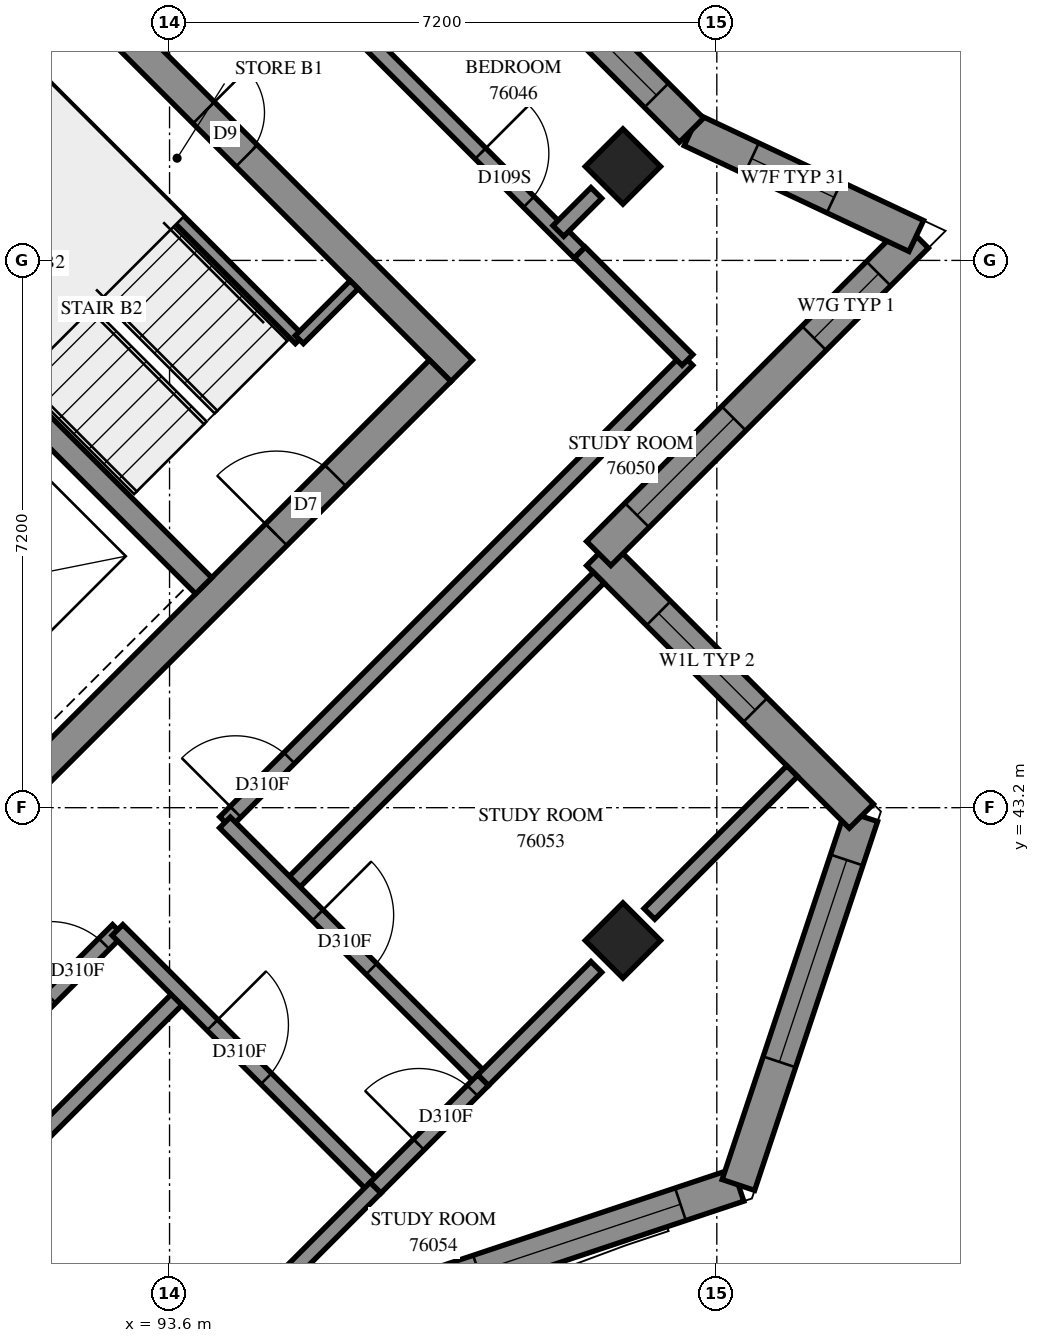
"""IFC4 building model, lengths in metres.
Left out: names, types, materials, properties, quantities, classifications, styles, units other than length and angle.
Written with IfcOpenShell. Run it as: python <this file> out.ifc"""

import sys

from ifc_helpers import new_model, si_unit, direction, frame, frame_2d, origin, origin_2d, place, context, subcontext, project, spatial, polyline, rectangle, outline, extrude, element, fill, save


model = new_model("IFC4")
c1 = context("Model", 3, precision=1e-05, world=origin(), true_north=direction((0.0, 1.0)))
c2 = subcontext(c1, "Body", "Model", "MODEL_VIEW")
j1 = project(units=[si_unit("LENGTHUNIT", "METRE"), si_unit("PLANEANGLEUNIT", "RADIAN")], contexts=[c1])
p1 = place(None, origin())
s1 = spatial("IfcSite", under=j1, at=p1, CompositionType="ELEMENT")
p2 = place(p1, origin())
s2 = spatial("IfcBuilding", under=s1, at=p2, CompositionType="ELEMENT")
p3 = place(p2, frame((0.0, 0.0, 277.8)))
s3 = spatial("IfcBuildingStorey", under=s2, at=p3, CompositionType="ELEMENT", Elevation=277.8)
for number, where, z_axis, x_axis in (
    (1, (99.565, 51.635, 0.0), (0.0, 0.0, 1.0), (0.707, -0.707, 0.0)),
    (2, (99.565, 41.453, 0.0), (0.0, 0.0, 1.0), (0.707, -0.707, 0.0)),
):
    element("IfcColumn", number, at=place(p3, frame(where, z_axis=z_axis, x_axis=x_axis)), inside=s3, PredefinedType="COLUMN", context=c2, shape_type="SweptSolid", body=[
        extrude(rectangle(XDim=0.7, YDim=0.7, at=origin_2d()), origin(), (0.0, 0.0, 1.0), 3.1),
    ])
p4 = place(p3, frame((86.695, 59.696, -0.3), z_axis=(0.0, 0.0, 1.0), x_axis=(0.7071100706, -0.7071034917, 0.0)))
e3 = element("IfcWall", 3, at=p4, inside=s3, PredefinedType="SHEAR", context=c2, shape_type="SweptSolid", body=[
    extrude(rectangle(XDim=15.2, YDim=0.4, at=frame_2d((7.6, 0.0))), origin(), (0.0, 0.0, 1.0), 2.7),
])
p5 = place(p4, frame((10.4, 0.0, 0.3)))
e4 = element("IfcOpeningElement", 4, at=p5, cuts=e3, PredefinedType="OPENING", context=c2, shape_type="SweptSolid", body=[
    extrude(rectangle(XDim=0.8, YDim=2.1, at=frame_2d((0.4, 1.05))), frame((0.0, 0.21, 0.0), z_axis=(0.0, -1.0, 0.0), x_axis=(1.0, 0.0, 0.0)), (0.0, 0.0, 1.0), 0.42),
])
p6 = place(p3, frame((86.978, 38.766, -0.3), z_axis=(0.0, 0.0, 1.0), x_axis=(0.7071067812, 0.7071067812, 0.0)))
e5 = element("IfcWall", 5, at=p6, inside=s3, PredefinedType="SHEAR", context=c2, shape_type="SweptSolid", body=[
    extrude(rectangle(XDim=14.4, YDim=0.4, at=frame_2d((7.2, 0.0))), origin(), (0.0, 0.0, 1.0), 2.7),
])
p7 = place(p6, frame((4.55, 0.0, 0.3)))
e6 = element("IfcOpeningElement", 6, at=p7, cuts=e5, PredefinedType="OPENING", context=c2, shape_type="SweptSolid", body=[
    extrude(rectangle(XDim=1.1, YDim=2.1, at=frame_2d((0.55, 1.05))), frame((0.0, 0.21, 0.0), z_axis=(0.0, -1.0, 0.0), x_axis=(1.0, 0.0, 0.0)), (0.0, 0.0, 1.0), 0.42),
])
p8 = place(p6, frame((11.35, 0.0, 0.3)))
e7 = element("IfcOpeningElement", 7, at=p8, cuts=e5, PredefinedType="OPENING", context=c2, shape_type="SweptSolid", body=[
    extrude(rectangle(XDim=1.1, YDim=2.1, at=frame_2d((0.55, 1.05))), frame((0.0, 0.21, 0.0), z_axis=(0.0, -1.0, 0.0), x_axis=(1.0, 0.0, 0.0)), (0.0, 0.0, 1.0), 0.42),
])
p9 = place(p3, frame((88.958, 51.211, 0.0), z_axis=(0.0, 0.0, 1.0), x_axis=(0.7070998367, -0.7071137256, 0.0)))
e8 = element("IfcWall", 8, at=p9, inside=s3, PredefinedType="SOLIDWALL", context=c2, shape_type="SweptSolid", body=[
    extrude(rectangle(XDim=7.2, YDim=0.3, at=frame_2d((3.6, 0.0))), origin(), (0.0, 0.0, 1.0), 3.1),
])
p10 = place(p3, frame((96.049, 36.559, 0.0), z_axis=(0.0, 0.0, 1.0), x_axis=(0.9486870665, 0.3162164604, 0.0)))
e9 = element("IfcWall", 9, at=p10, inside=s3, PredefinedType="SOLIDWALL", context=c2, shape_type="SweptSolid", body=[
    extrude(outline(polyline([(0.053, -0.225), (5.42, -0.225), (5.195, 0.225), (-0.053, 0.225), (0.053, -0.225)])), origin(), (0.0, 0.0, 1.0), 3.1),
])
p11 = place(p10, frame((1.704, 0.0, 0.45)))
e10 = element("IfcOpeningElement", 10, at=p11, cuts=e9, PredefinedType="OPENING", context=c2, shape_type="SweptSolid", body=[
    extrude(rectangle(XDim=2.8, YDim=2.55, at=frame_2d((1.4, 1.275))), frame((0.0, 0.235, 0.0), z_axis=(0.0, -1.0, 0.0), x_axis=(1.0, 0.0, 0.0)), (0.0, 0.0, 1.0), 0.47),
])
p12 = place(p3, frame((101.084, 38.237, 0.0), z_axis=(0.0, 0.0, 1.0), x_axis=(0.3162453612, 0.9486774328, 0.0)))
e11 = element("IfcWall", 11, at=p12, inside=s3, PredefinedType="SOLIDWALL", context=c2, shape_type="SweptSolid", body=[
    extrude(outline(polyline([(-0.113, -0.225), (5.254, -0.225), (4.976, 0.225), (0.113, 0.225), (-0.113, -0.225)])), origin(), (0.0, 0.0, 1.0), 3.1),
])
p13 = place(p12, frame((1.706, 0.0, 0.45)))
e12 = element("IfcOpeningElement", 12, at=p13, cuts=e11, PredefinedType="OPENING", context=c2, shape_type="SweptSolid", body=[
    extrude(rectangle(XDim=2.8, YDim=2.55, at=frame_2d((1.4, 1.275))), frame((0.0, 0.235, 0.0), z_axis=(0.0, -1.0, 0.0), x_axis=(1.0, 0.0, 0.0)), (0.0, 0.0, 1.0), 0.47),
])
p14 = place(p3, frame((102.701, 43.089, 0.0), z_axis=(0.0, 0.0, 1.0), x_axis=(-0.7070965479, 0.7071170144, 0.0)))
e13 = element("IfcWall", 13, at=p14, inside=s3, PredefinedType="SOLIDWALL", context=c2, shape_type="SweptSolid", body=[
    extrude(outline(polyline([(-0.139, -0.225), (4.661, -0.225), (5.111, 0.225), (0.139, 0.225), (-0.139, -0.225)])), origin(), (0.0, 0.0, 1.0), 3.1),
])
p15 = place(p14, frame((1.974, 0.0, 0.6)))
e14 = element("IfcOpeningElement", 14, at=p15, cuts=e13, PredefinedType="OPENING", context=c2, shape_type="SweptSolid", body=[
    extrude(rectangle(XDim=1.8, YDim=1.9, at=frame_2d((0.9, 0.95))), frame((0.0, 0.235, 0.0), z_axis=(0.0, -1.0, 0.0), x_axis=(1.0, 0.0, 0.0)), (0.0, 0.0, 1.0), 0.47),
])
p16 = place(p3, frame((99.246, 46.544, 0.0), z_axis=(0.0, 0.0, 1.0), x_axis=(0.7071067812, 0.7071067812, 0.0)))
e15 = element("IfcWall", 15, at=p16, inside=s3, PredefinedType="SOLIDWALL", context=c2, shape_type="SweptSolid", body=[
    extrude(outline(polyline([(0.225, -0.225), (6.228, -0.225), (5.588, 0.225), (-0.225, 0.225), (0.225, -0.225)])), origin(), (0.0, 0.0, 1.0), 3.1),
])
p17 = place(p16, frame((0.713, 0.0, 0.6)))
e16 = element("IfcOpeningElement", 16, at=p17, cuts=e15, PredefinedType="OPENING", context=c2, shape_type="SweptSolid", body=[
    extrude(rectangle(XDim=1.8, YDim=1.9, at=frame_2d((0.9, 0.95))), frame((0.0, 0.235, 0.0), z_axis=(0.0, -1.0, 0.0), x_axis=(1.0, 0.0, 0.0)), (0.0, 0.0, 1.0), 0.47),
])
p18 = place(p16, frame((4.006, 0.0, 0.6)))
e17 = element("IfcOpeningElement", 17, at=p18, cuts=e15, PredefinedType="OPENING", context=c2, shape_type="SweptSolid", body=[
    extrude(rectangle(XDim=1.2, YDim=1.9, at=frame_2d((0.6, 0.95))), frame((0.0, 0.235, 0.0), z_axis=(0.0, -1.0, 0.0), x_axis=(1.0, 0.0, 0.0)), (0.0, 0.0, 1.0), 0.47),
])
p19 = place(p3, frame((103.424, 50.722, 0.0), z_axis=(0.0, 0.0, 1.0), x_axis=(-0.9049018861, 0.4256202258, 0.0)))
e18 = element("IfcWall", 18, at=p19, inside=s3, PredefinedType="SOLIDWALL", context=c2, shape_type="SweptSolid", body=[
    extrude(outline(polyline([(-0.32, -0.225), (3.229, -0.225), (3.308, 0.225), (0.32, 0.225), (-0.32, -0.225)])), origin(), (0.0, 0.0, 1.0), 3.1),
])
p20 = place(p19, frame((1.194, 0.0, 0.45)))
e19 = element("IfcOpeningElement", 19, at=p20, cuts=e18, PredefinedType="OPENING", context=c2, shape_type="SweptSolid", body=[
    extrude(rectangle(XDim=1.2, YDim=2.55, at=frame_2d((0.6, 1.275))), frame((0.0, 0.235, 0.0), z_axis=(0.0, -1.0, 0.0), x_axis=(1.0, 0.0, 0.0)), (0.0, 0.0, 1.0), 0.47),
])
p21 = place(p3, frame((100.466, 52.113, 0.0), z_axis=(0.0, 0.0, 1.0), x_axis=(-0.7071067812, 0.7071067812, 0.0)))
e20 = element("IfcWall", 20, at=p21, inside=s3, PredefinedType="SOLIDWALL", context=c2, shape_type="SweptSolid", body=[
    extrude(outline(polyline([(0.039, -0.225), (6.718, -0.225), (6.718, 0.225), (-0.039, 0.225), (0.039, -0.225)])), origin(), (0.0, 0.0, 1.0), 3.1),
])
p22 = place(p21, frame((0.65, 0.0, 0.45)))
e21 = element("IfcOpeningElement", 21, at=p22, cuts=e20, PredefinedType="OPENING", context=c2, shape_type="SweptSolid", body=[
    extrude(rectangle(XDim=2.8, YDim=2.55, at=frame_2d((1.4, 1.275))), frame((0.0, 0.235, 0.0), z_axis=(0.0, -1.0, 0.0), x_axis=(1.0, 0.0, 0.0)), (0.0, 0.0, 1.0), 0.47),
])
p23 = place(p21, frame((4.909, 0.0, 0.45)))
e22 = element("IfcOpeningElement", 22, at=p23, cuts=e20, PredefinedType="OPENING", context=c2, shape_type="SweptSolid", body=[
    extrude(rectangle(XDim=1.2, YDim=2.55, at=frame_2d((0.6, 1.275))), frame((0.0, 0.235, 0.0), z_axis=(0.0, -1.0, 0.0), x_axis=(1.0, 0.0, 0.0)), (0.0, 0.0, 1.0), 0.47),
])
p24 = place(p3, frame((91.313, 53.354, 0.0), z_axis=(0.0, 0.0, 1.0), x_axis=(0.7071067812, -0.7071067812, 0.0)))
e23 = element("IfcWall", 23, at=p24, inside=s3, PredefinedType="PARTITIONING", context=c2, shape_type="SweptSolid", body=[
    extrude(rectangle(XDim=5.65, YDim=0.15, at=frame_2d((2.825, 0.0))), origin(), (0.0, 0.0, 1.0), 3.1),
])
p25 = place(p3, frame((95.308, 49.358, 0.0), z_axis=(0.0, 0.0, 1.0), x_axis=(0.70705776, 0.707155799, 0.0)))
e24 = element("IfcWall", 24, at=p25, inside=s3, PredefinedType="PARTITIONING", context=c2, shape_type="SweptSolid", body=[
    extrude(rectangle(XDim=1.02, YDim=0.15, at=frame_2d((0.51, 0.0))), origin(), (0.0, 0.0, 1.0), 3.1),
])
p26 = place(p3, frame((86.306, 33.287, 0.0), z_axis=(0.0, 0.0, 1.0), x_axis=(0.7071020418, 0.7071115206, 0.0)))
e25 = element("IfcWall", 25, at=p26, inside=s3, PredefinedType="PARTITIONING", context=c2, shape_type="SweptSolid", body=[
    extrude(rectangle(XDim=10.55, YDim=0.2, at=frame_2d((5.275, 0.0))), origin(), (0.0, 0.0, 1.0), 3.1),
])
p27 = place(p3, frame((94.331, 43.009, 0.0), z_axis=(0.0, 0.0, 1.0), x_axis=(0.7071067812, 0.7071067812, 0.0)))
e26 = element("IfcWall", 26, at=p27, inside=s3, PredefinedType="PARTITIONING", context=c2, shape_type="SweptSolid", body=[
    extrude(rectangle(XDim=8.601, YDim=0.2, at=frame_2d((4.301, 0.0))), origin(), (0.0, 0.0, 1.0), 3.1),
])
p28 = place(p27, frame((0.194, 0.0, 0.0)))
e27 = element("IfcOpeningElement", 27, at=p28, cuts=e26, PredefinedType="OPENING", context=c2, shape_type="SweptSolid", body=[
    extrude(rectangle(XDim=1.0, YDim=2.1, at=frame_2d((0.5, 1.05))), frame((0.0, 0.11, 0.0), z_axis=(0.0, -1.0, 0.0), x_axis=(1.0, 0.0, 0.0)), (0.0, 0.0, 1.0), 0.22),
])
p29 = place(p3, frame((86.839, 35.511, 0.0), z_axis=(0.0, 0.0, 1.0), x_axis=(0.707223053, 0.7069904903, 0.0)))
e28 = element("IfcWall", 28, at=p29, inside=s3, PredefinedType="PARTITIONING", context=c2, shape_type="SweptSolid", body=[
    extrude(rectangle(XDim=8.6, YDim=0.2, at=frame_2d((4.3, 0.0))), origin(), (0.0, 0.0, 1.0), 3.1),
])
p30 = place(p29, frame((7.343, 0.0, 0.0)))
e29 = element("IfcOpeningElement", 29, at=p30, cuts=e28, PredefinedType="OPENING", context=c2, shape_type="SweptSolid", body=[
    extrude(rectangle(XDim=1.0, YDim=2.1, at=frame_2d((0.5, 1.05))), frame((0.0, 0.11, 0.0), z_axis=(0.0, -1.0, 0.0), x_axis=(1.0, 0.0, 0.0)), (0.0, 0.0, 1.0), 0.22),
])
p31 = place(p3, frame((94.617, 54.879, 0.0), z_axis=(0.0, 0.0, 1.0), x_axis=(0.7071067812, -0.7071067812, 0.0)))
e30 = element("IfcWall", 30, at=p31, inside=s3, PredefinedType="PARTITIONING", context=c2, shape_type="SweptSolid", body=[
    extrude(rectangle(XDim=6.191, YDim=0.2, at=frame_2d((3.096, 0.0))), origin(), (0.0, 0.0, 1.0), 3.1),
])
p32 = place(p31, frame((4.346, 0.0, 0.0)))
e31 = element("IfcOpeningElement", 31, at=p32, cuts=e30, PredefinedType="OPENING", context=c2, shape_type="SweptSolid", body=[
    extrude(rectangle(XDim=0.9, YDim=2.1, at=frame_2d((0.45, 1.05))), frame((0.0, 0.11, 0.0), z_axis=(0.0, -1.0, 0.0), x_axis=(1.0, 0.0, 0.0)), (0.0, 0.0, 1.0), 0.22),
])
p33 = place(p3, frame((95.179, 42.161, 0.0), z_axis=(0.0, 0.0, 1.0), x_axis=(0.707115476, 0.7070980863, 0.0)))
e32 = element("IfcWall", 32, at=p33, inside=s3, PredefinedType="PARTITIONING", context=c2, shape_type="SweptSolid", body=[
    extrude(rectangle(XDim=5.75, YDim=0.2, at=frame_2d((2.875, 0.0))), origin(), (0.0, 0.0, 1.0), 3.1),
])
p34 = place(p3, frame((92.915, 41.591, 0.0), z_axis=(0.0, 0.0, 1.0), x_axis=(0.7071067812, -0.7071067812, 0.0)))
e33 = element("IfcWall", 33, at=p34, inside=s3, PredefinedType="PARTITIONING", context=c2, shape_type="SweptSolid", body=[
    extrude(rectangle(XDim=4.8, YDim=0.2, at=frame_2d((2.4, 0.0))), origin(), (0.0, 0.0, 1.0), 3.1),
])
p35 = place(p34, frame((1.767, 0.0, 0.0)))
e34 = element("IfcOpeningElement", 34, at=p35, cuts=e33, PredefinedType="OPENING", context=c2, shape_type="SweptSolid", body=[
    extrude(rectangle(XDim=1.0, YDim=2.1, at=frame_2d((0.5, 1.05))), frame((0.0, 0.11, 0.0), z_axis=(0.0, -1.0, 0.0), x_axis=(1.0, 0.0, 0.0)), (0.0, 0.0, 1.0), 0.22),
])
p36 = place(p3, frame((94.329, 43.005, 0.0), z_axis=(0.0, 0.0, 1.0), x_axis=(0.7071067812, -0.7071067812, 0.0)))
e35 = element("IfcWall", 35, at=p36, inside=s3, PredefinedType="PARTITIONING", context=c2, shape_type="SweptSolid", body=[
    extrude(rectangle(XDim=4.8, YDim=0.2, at=frame_2d((2.4, 0.0))), origin(), (0.0, 0.0, 1.0), 3.1),
])
p37 = place(p36, frame((1.725, 0.0, 0.0)))
e36 = element("IfcOpeningElement", 36, at=p37, cuts=e35, PredefinedType="OPENING", context=c2, shape_type="SweptSolid", body=[
    extrude(rectangle(XDim=1.0, YDim=2.1, at=frame_2d((0.5, 1.05))), frame((0.0, 0.11, 0.0), z_axis=(0.0, -1.0, 0.0), x_axis=(1.0, 0.0, 0.0)), (0.0, 0.0, 1.0), 0.22),
])
p38 = place(p3, frame((99.913, 41.803, 0.0), z_axis=(0.0, 0.0, 1.0), x_axis=(0.7071067812, 0.7071067812, 0.0)))
e37 = element("IfcWall", 37, at=p38, inside=s3, PredefinedType="PARTITIONING", context=c2, shape_type="SweptSolid", body=[
    extrude(rectangle(XDim=2.656, YDim=0.2, at=frame_2d((1.328, 0.0))), origin(), (0.0, 0.0, 1.0), 3.1),
])
p39 = place(p3, frame((97.725, 39.615, 0.0), z_axis=(0.0, 0.0, 1.0), x_axis=(0.7071067812, 0.7071067812, 0.0)))
e38 = element("IfcWall", 38, at=p39, inside=s3, PredefinedType="PARTITIONING", context=c2, shape_type="SweptSolid", body=[
    extrude(rectangle(XDim=2.107, YDim=0.2, at=frame_2d((1.054, 0.0))), origin(), (0.0, 0.0, 1.0), 2.6),
])
p40 = place(p3, frame((94.823, 36.713, 0.0), z_axis=(0.0, 0.0, 1.0), x_axis=(0.7071067812, 0.7071067812, 0.0)))
e39 = element("IfcWall", 39, at=p40, inside=s3, PredefinedType="PARTITIONING", context=c2, shape_type="SweptSolid", body=[
    extrude(rectangle(XDim=2.104, YDim=0.2, at=frame_2d((1.052, 0.0))), origin(), (0.0, 0.0, 1.0), 2.6),
])
p41 = place(p3, frame((98.998, 50.504, 0.0), z_axis=(0.0, 0.0, 1.0), x_axis=(0.7076063266, -0.7066068826, 0.0)))
e40 = element("IfcWall", 40, at=p41, inside=s3, PredefinedType="PARTITIONING", context=c2, shape_type="SweptSolid", body=[
    extrude(rectangle(XDim=2.001, YDim=0.2, at=frame_2d((1.001, 0.0))), origin(), (0.0, 0.0, 1.0), 3.1),
])
p42 = place(p3, frame((96.311, 38.201, 0.0), z_axis=(0.0, 0.0, 1.0), x_axis=(0.7071067812, 0.7071067812, 0.0)))
e41 = element("IfcWall", 41, at=p42, inside=s3, PredefinedType="PARTITIONING", context=c2, shape_type="SweptSolid", body=[
    extrude(rectangle(XDim=2.0, YDim=0.2, at=frame_2d((1.0, 0.0))), origin(), (0.0, 0.0, 1.0), 2.6),
])
p43 = place(p42, frame((0.803, 0.0, 0.0)))
e42 = element("IfcOpeningElement", 42, at=p43, cuts=e41, PredefinedType="OPENING", context=c2, shape_type="SweptSolid", body=[
    extrude(rectangle(XDim=1.0, YDim=2.1, at=frame_2d((0.5, 1.05))), frame((0.0, 0.11, 0.0), z_axis=(0.0, -1.0, 0.0), x_axis=(1.0, 0.0, 0.0)), (0.0, 0.0, 1.0), 0.22),
])
p44 = place(p3, frame((98.715, 50.787, 0.0), z_axis=(0.0, 0.0, 1.0), x_axis=(0.7071067812, 0.7071067812, 0.0)))
e43 = element("IfcWall", 43, at=p44, inside=s3, PredefinedType="PARTITIONING", context=c2, shape_type="SweptSolid", body=[
    extrude(rectangle(XDim=0.707, YDim=0.2, at=frame_2d((0.353, 0.0))), origin(), (0.0, 0.0, 1.0), 3.1),
])
p45 = place(p11, origin())
e44 = element("IfcWindow", 44, at=p45, inside=s3, PartitioningType="SINGLE_PANEL", PredefinedType="WINDOW", context=c2, shape_type="SweptSolid", body=[
    extrude(rectangle(XDim=2.8, YDim=2.55, at=frame_2d((1.4, 1.275))), frame((0.0, 0.205, 0.0), z_axis=(0.0, -1.0, 0.0), x_axis=(1.0, 0.0, 0.0)), (0.0, 0.0, 1.0), 0.06),
])
fill(e10, e44)
p46 = place(p13, origin())
e45 = element("IfcWindow", 45, at=p46, inside=s3, PartitioningType="SINGLE_PANEL", PredefinedType="WINDOW", context=c2, shape_type="SweptSolid", body=[
    extrude(rectangle(XDim=2.8, YDim=2.55, at=frame_2d((1.4, 1.275))), frame((0.0, 0.205, 0.0), z_axis=(0.0, -1.0, 0.0), x_axis=(1.0, 0.0, 0.0)), (0.0, 0.0, 1.0), 0.06),
])
fill(e12, e45)
p47 = place(p15, origin())
e46 = element("IfcWindow", 46, at=p47, inside=s3, PartitioningType="SINGLE_PANEL", PredefinedType="WINDOW", context=c2, shape_type="SweptSolid", body=[
    extrude(rectangle(XDim=1.8, YDim=1.9, at=frame_2d((0.9, 0.95))), frame((0.0, 0.205, 0.0), z_axis=(0.0, -1.0, 0.0), x_axis=(1.0, 0.0, 0.0)), (0.0, 0.0, 1.0), 0.06),
])
fill(e14, e46)
p48 = place(p17, origin())
e47 = element("IfcWindow", 47, at=p48, inside=s3, PartitioningType="SINGLE_PANEL", PredefinedType="WINDOW", context=c2, shape_type="SweptSolid", body=[
    extrude(rectangle(XDim=1.8, YDim=1.9, at=frame_2d((0.9, 0.95))), frame((0.0, 0.205, 0.0), z_axis=(0.0, -1.0, 0.0), x_axis=(1.0, 0.0, 0.0)), (0.0, 0.0, 1.0), 0.06),
])
fill(e16, e47)
p49 = place(p18, origin())
e48 = element("IfcWindow", 48, at=p49, inside=s3, PartitioningType="SINGLE_PANEL", PredefinedType="WINDOW", context=c2, shape_type="SweptSolid", body=[
    extrude(rectangle(XDim=1.2, YDim=1.9, at=frame_2d((0.6, 0.95))), frame((0.0, 0.205, 0.0), z_axis=(0.0, -1.0, 0.0), x_axis=(1.0, 0.0, 0.0)), (0.0, 0.0, 1.0), 0.06),
])
fill(e17, e48)
p50 = place(p20, origin())
e49 = element("IfcWindow", 49, at=p50, inside=s3, PartitioningType="SINGLE_PANEL", PredefinedType="WINDOW", context=c2, shape_type="SweptSolid", body=[
    extrude(rectangle(XDim=1.2, YDim=2.55, at=frame_2d((0.6, 1.275))), frame((0.0, 0.205, 0.0), z_axis=(0.0, -1.0, 0.0), x_axis=(1.0, 0.0, 0.0)), (0.0, 0.0, 1.0), 0.06),
])
fill(e19, e49)
p51 = place(p22, origin())
e50 = element("IfcWindow", 50, at=p51, inside=s3, PartitioningType="SINGLE_PANEL", PredefinedType="WINDOW", context=c2, shape_type="SweptSolid", body=[
    extrude(rectangle(XDim=2.8, YDim=2.55, at=frame_2d((1.4, 1.275))), frame((0.0, 0.205, 0.0), z_axis=(0.0, -1.0, 0.0), x_axis=(1.0, 0.0, 0.0)), (0.0, 0.0, 1.0), 0.06),
])
fill(e21, e50)
p52 = place(p5, origin())
e51 = element("IfcDoor", 51, at=p52, inside=s3, OperationType="SINGLE_SWING_RIGHT", PredefinedType="DOOR", context=c2, shape_type="SweptSolid", body=[
    extrude(rectangle(XDim=0.8, YDim=2.1, at=frame_2d((0.4, 1.05))), frame((0.0, 0.025, 0.0), z_axis=(0.0, -1.0, 0.0), x_axis=(1.0, 0.0, 0.0)), (0.0, 0.0, 1.0), 0.05),
])
fill(e4, e51)
p53 = place(p8, origin())
e52 = element("IfcDoor", 52, at=p53, inside=s3, OperationType="SINGLE_SWING_RIGHT", PredefinedType="DOOR", context=c2, shape_type="SweptSolid", body=[
    extrude(rectangle(XDim=1.1, YDim=2.1, at=frame_2d((0.55, 1.05))), frame((0.0, 0.025, 0.0), z_axis=(0.0, -1.0, 0.0), x_axis=(1.0, 0.0, 0.0)), (0.0, 0.0, 1.0), 0.05),
])
fill(e7, e52)
p54 = place(p32, origin())
e53 = element("IfcDoor", 53, at=p54, inside=s3, OperationType="SINGLE_SWING_LEFT", PredefinedType="DOOR", context=c2, shape_type="SweptSolid", body=[
    extrude(rectangle(XDim=0.9, YDim=2.1, at=frame_2d((0.45, 1.05))), frame((0.0, 0.025, 0.0), z_axis=(0.0, -1.0, 0.0), x_axis=(1.0, 0.0, 0.0)), (0.0, 0.0, 1.0), 0.05),
])
fill(e31, e53)
p55 = place(p28, origin())
e54 = element("IfcDoor", 54, at=p55, inside=s3, OperationType="SINGLE_SWING_LEFT", PredefinedType="DOOR", context=c2, shape_type="SweptSolid", body=[
    extrude(rectangle(XDim=1.0, YDim=2.1, at=frame_2d((0.5, 1.05))), frame((0.0, 0.025, 0.0), z_axis=(0.0, -1.0, 0.0), x_axis=(1.0, 0.0, 0.0)), (0.0, 0.0, 1.0), 0.05),
])
fill(e27, e54)
p56 = place(p30, origin())
e55 = element("IfcDoor", 55, at=p56, inside=s3, OperationType="SINGLE_SWING_RIGHT", PredefinedType="DOOR", context=c2, shape_type="SweptSolid", body=[
    extrude(rectangle(XDim=1.0, YDim=2.1, at=frame_2d((0.5, 1.05))), frame((0.0, 0.025, 0.0), z_axis=(0.0, -1.0, 0.0), x_axis=(1.0, 0.0, 0.0)), (0.0, 0.0, 1.0), 0.05),
])
fill(e29, e55)
p57 = place(p35, origin())
e56 = element("IfcDoor", 56, at=p57, inside=s3, OperationType="SINGLE_SWING_LEFT", PredefinedType="DOOR", context=c2, shape_type="SweptSolid", body=[
    extrude(rectangle(XDim=1.0, YDim=2.1, at=frame_2d((0.5, 1.05))), frame((0.0, 0.025, 0.0), z_axis=(0.0, -1.0, 0.0), x_axis=(1.0, 0.0, 0.0)), (0.0, 0.0, 1.0), 0.05),
])
fill(e34, e56)
p58 = place(p37, origin())
e57 = element("IfcDoor", 57, at=p58, inside=s3, OperationType="SINGLE_SWING_RIGHT", PredefinedType="DOOR", context=c2, shape_type="SweptSolid", body=[
    extrude(rectangle(XDim=1.0, YDim=2.1, at=frame_2d((0.5, 1.05))), frame((0.0, 0.025, 0.0), z_axis=(0.0, -1.0, 0.0), x_axis=(1.0, 0.0, 0.0)), (0.0, 0.0, 1.0), 0.05),
])
fill(e36, e57)
p59 = place(p43, origin())
e58 = element("IfcDoor", 58, at=p59, inside=s3, OperationType="SINGLE_SWING_RIGHT", PredefinedType="DOOR", context=c2, shape_type="SweptSolid", body=[
    extrude(rectangle(XDim=1.0, YDim=2.1, at=frame_2d((0.5, 1.05))), frame((0.0, 0.025, 0.0), z_axis=(0.0, -1.0, 0.0), x_axis=(1.0, 0.0, 0.0)), (0.0, 0.0, 1.0), 0.05),
])
fill(e42, e58)
save(model, sys.argv[1])
